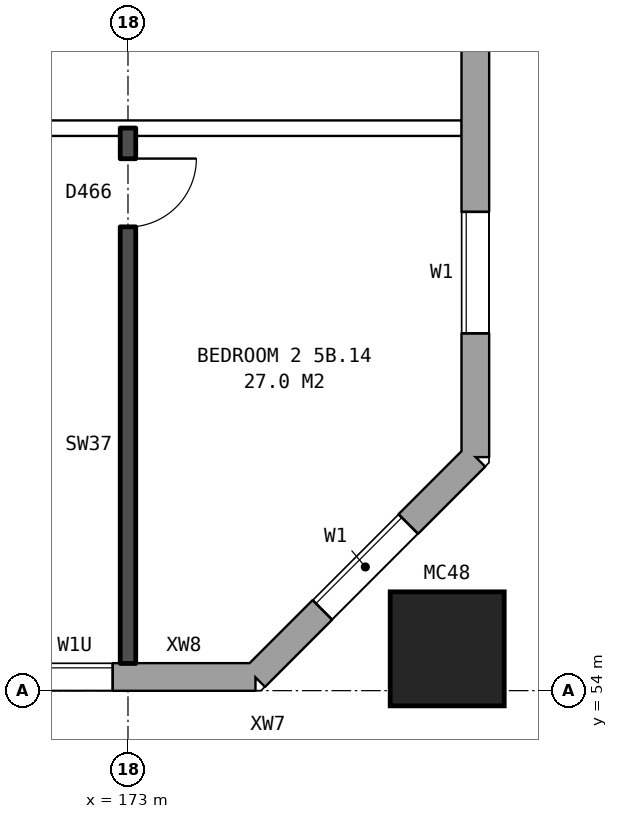
"""IFC4 building model, lengths in metres.
Left out: names, types, materials, properties, quantities, classifications, styles, units other than length and angle.
Written with IfcOpenShell. Run it as: python <this file> out.ifc"""

import sys

from ifc_helpers import new_model, si_unit, direction, frame, frame_2d, origin, origin_2d, place, context, subcontext, project, spatial, rectangle, hollow_rectangle, extrude, element, fill, save


model = new_model("IFC4")
c1 = context("Model", 3, precision=1e-05, world=origin(), true_north=direction((0.0, 1.0)))
c2 = subcontext(c1, "Body", "Model", "MODEL_VIEW")
j1 = project(units=[si_unit("LENGTHUNIT", "METRE"), si_unit("PLANEANGLEUNIT", "RADIAN")], contexts=[c1])
p1 = place(None, origin())
s1 = spatial("IfcSite", under=j1, at=p1, CompositionType="ELEMENT")
p2 = place(p1, origin())
s2 = spatial("IfcBuilding", under=s1, at=p2, CompositionType="ELEMENT")
p3 = place(p2, frame((0.0, 0.0, 22.6)))
s3 = spatial("IfcBuildingStorey", under=s2, at=p3, CompositionType="ELEMENT", Elevation=22.6)
p4 = place(p3, frame((177.2, 54.55, 0.0), z_axis=(0.0, 0.0, 1.0), x_axis=(1.0, 0.0, 0.0)))
e1 = element("IfcColumn", 1, at=p4, inside=s3, PredefinedType="COLUMN", context=c2, shape_type="SweptSolid", body=[
    extrude(hollow_rectangle(XDim=1.5, YDim=1.5, WallThickness=0.08, at=origin_2d()), origin(), (0.0, 0.0, 1.0), 3.1),
])
p5 = place(p3, frame((134.075, 54.18, 0.0), z_axis=(0.0, 0.0, 1.0), x_axis=(1.0, 0.0, 0.0)))
e2 = element("IfcWall", 2, at=p5, inside=s3, PredefinedType="STANDARD", context=c2, shape_type="SweptSolid", body=[
    extrude(rectangle(XDim=40.601, YDim=0.36, at=frame_2d((20.3, 0.0))), origin(), (0.0, 0.0, 1.0), 2.85),
])
p6 = place(p5, frame((0.3, 0.0, 0.8)))
e3 = element("IfcOpeningElement", 3, at=p6, cuts=e2, PredefinedType="OPENING", context=c2, shape_type="SweptSolid", body=[
    extrude(rectangle(XDim=1.4, YDim=1.8, at=frame_2d((0.7, 0.9))), frame((0.0, 0.19, 0.0), z_axis=(0.0, -1.0, 0.0), x_axis=(1.0, 0.0, 0.0)), (0.0, 0.0, 1.0), 0.38),
])
p7 = place(p5, frame((4.125, 0.0, 0.8)))
e4 = element("IfcOpeningElement", 4, at=p7, cuts=e2, PredefinedType="OPENING", context=c2, shape_type="SweptSolid", body=[
    extrude(rectangle(XDim=0.8, YDim=0.9, at=frame_2d((0.4, 0.45))), frame((0.0, 0.19, 0.0), z_axis=(0.0, -1.0, 0.0), x_axis=(1.0, 0.0, 0.0)), (0.0, 0.0, 1.0), 0.38),
])
p8 = place(p5, frame((6.625, 0.0, 0.8)))
e5 = element("IfcOpeningElement", 5, at=p8, cuts=e2, PredefinedType="OPENING", context=c2, shape_type="SweptSolid", body=[
    extrude(rectangle(XDim=1.6, YDim=1.8, at=frame_2d((0.8, 0.9))), frame((0.0, 0.19, 0.0), z_axis=(0.0, -1.0, 0.0), x_axis=(1.0, 0.0, 0.0)), (0.0, 0.0, 1.0), 0.38),
])
p9 = place(p5, frame((9.625, 0.0, 0.8)))
e6 = element("IfcOpeningElement", 6, at=p9, cuts=e2, PredefinedType="OPENING", context=c2, shape_type="SweptSolid", body=[
    extrude(rectangle(XDim=1.6, YDim=1.8, at=frame_2d((0.8, 0.9))), frame((0.0, 0.19, 0.0), z_axis=(0.0, -1.0, 0.0), x_axis=(1.0, 0.0, 0.0)), (0.0, 0.0, 1.0), 0.38),
])
p10 = place(p5, frame((12.625, 0.0, 0.8)))
e7 = element("IfcOpeningElement", 7, at=p10, cuts=e2, PredefinedType="OPENING", context=c2, shape_type="SweptSolid", body=[
    extrude(rectangle(XDim=1.6, YDim=1.8, at=frame_2d((0.8, 0.9))), frame((0.0, 0.19, 0.0), z_axis=(0.0, -1.0, 0.0), x_axis=(1.0, 0.0, 0.0)), (0.0, 0.0, 1.0), 0.38),
])
p11 = place(p5, frame((15.625, 0.0, 0.8)))
e8 = element("IfcOpeningElement", 8, at=p11, cuts=e2, PredefinedType="OPENING", context=c2, shape_type="SweptSolid", body=[
    extrude(rectangle(XDim=1.6, YDim=1.8, at=frame_2d((0.8, 0.9))), frame((0.0, 0.19, 0.0), z_axis=(0.0, -1.0, 0.0), x_axis=(1.0, 0.0, 0.0)), (0.0, 0.0, 1.0), 0.38),
])
p12 = place(p5, frame((18.625, 0.0, 0.8)))
e9 = element("IfcOpeningElement", 9, at=p12, cuts=e2, PredefinedType="OPENING", context=c2, shape_type="SweptSolid", body=[
    extrude(rectangle(XDim=1.6, YDim=1.8, at=frame_2d((0.8, 0.9))), frame((0.0, 0.19, 0.0), z_axis=(0.0, -1.0, 0.0), x_axis=(1.0, 0.0, 0.0)), (0.0, 0.0, 1.0), 0.38),
])
p13 = place(p5, frame((21.625, 0.0, 0.8)))
e10 = element("IfcOpeningElement", 10, at=p13, cuts=e2, PredefinedType="OPENING", context=c2, shape_type="SweptSolid", body=[
    extrude(rectangle(XDim=1.6, YDim=1.8, at=frame_2d((0.8, 0.9))), frame((0.0, 0.19, 0.0), z_axis=(0.0, -1.0, 0.0), x_axis=(1.0, 0.0, 0.0)), (0.0, 0.0, 1.0), 0.38),
])
p14 = place(p5, frame((24.625, 0.0, 0.8)))
e11 = element("IfcOpeningElement", 11, at=p14, cuts=e2, PredefinedType="OPENING", context=c2, shape_type="SweptSolid", body=[
    extrude(rectangle(XDim=1.6, YDim=1.8, at=frame_2d((0.8, 0.9))), frame((0.0, 0.19, 0.0), z_axis=(0.0, -1.0, 0.0), x_axis=(1.0, 0.0, 0.0)), (0.0, 0.0, 1.0), 0.38),
])
p15 = place(p5, frame((27.625, 0.0, 0.8)))
e12 = element("IfcOpeningElement", 12, at=p15, cuts=e2, PredefinedType="OPENING", context=c2, shape_type="SweptSolid", body=[
    extrude(rectangle(XDim=1.6, YDim=1.8, at=frame_2d((0.8, 0.9))), frame((0.0, 0.19, 0.0), z_axis=(0.0, -1.0, 0.0), x_axis=(1.0, 0.0, 0.0)), (0.0, 0.0, 1.0), 0.38),
])
p16 = place(p5, frame((30.625, 0.0, 0.8)))
e13 = element("IfcOpeningElement", 13, at=p16, cuts=e2, PredefinedType="OPENING", context=c2, shape_type="SweptSolid", body=[
    extrude(rectangle(XDim=1.6, YDim=1.8, at=frame_2d((0.8, 0.9))), frame((0.0, 0.19, 0.0), z_axis=(0.0, -1.0, 0.0), x_axis=(1.0, 0.0, 0.0)), (0.0, 0.0, 1.0), 0.38),
])
p17 = place(p5, frame((33.625, 0.0, 0.8)))
e14 = element("IfcOpeningElement", 14, at=p17, cuts=e2, PredefinedType="OPENING", context=c2, shape_type="SweptSolid", body=[
    extrude(rectangle(XDim=1.6, YDim=1.8, at=frame_2d((0.8, 0.9))), frame((0.0, 0.19, 0.0), z_axis=(0.0, -1.0, 0.0), x_axis=(1.0, 0.0, 0.0)), (0.0, 0.0, 1.0), 0.38),
])
p18 = place(p5, frame((35.525, 0.0, 0.8)))
e15 = element("IfcOpeningElement", 15, at=p18, cuts=e2, PredefinedType="OPENING", context=c2, shape_type="SweptSolid", body=[
    extrude(rectangle(XDim=0.6, YDim=1.2, at=frame_2d((0.3, 0.6))), frame((0.0, 0.19, 0.0), z_axis=(0.0, -1.0, 0.0), x_axis=(1.0, 0.0, 0.0)), (0.0, 0.0, 1.0), 0.38),
])
p19 = place(p5, frame((2.0, 0.0, 1.5)))
e16 = element("IfcOpeningElement", 16, at=p19, cuts=e2, PredefinedType="OPENING", context=c2, shape_type="SweptSolid", body=[
    extrude(rectangle(XDim=0.6, YDim=0.9, at=frame_2d((0.3, 0.45))), frame((0.0, 0.19, 0.0), z_axis=(0.0, -1.0, 0.0), x_axis=(1.0, 0.0, 0.0)), (0.0, 0.0, 1.0), 0.38),
])
p20 = place(p5, frame((5.225, 0.0, 0.8)))
e17 = element("IfcOpeningElement", 17, at=p20, cuts=e2, PredefinedType="OPENING", context=c2, shape_type="SweptSolid", body=[
    extrude(rectangle(XDim=1.0, YDim=1.8, at=frame_2d((0.5, 0.9))), frame((0.0, 0.19, 0.0), z_axis=(0.0, -1.0, 0.0), x_axis=(1.0, 0.0, 0.0)), (0.0, 0.0, 1.0), 0.38),
])
p21 = place(p5, frame((37.725, 0.0, 1.7)))
e18 = element("IfcOpeningElement", 18, at=p21, cuts=e2, PredefinedType="OPENING", context=c2, shape_type="SweptSolid", body=[
    extrude(rectangle(XDim=1.0, YDim=0.9, at=frame_2d((0.5, 0.45))), frame((0.0, 0.19, 0.0), z_axis=(0.0, -1.0, 0.0), x_axis=(1.0, 0.0, 0.0)), (0.0, 0.0, 1.0), 0.38),
])
p22 = place(p3, frame((174.675, 54.18, 0.0), z_axis=(0.0, 0.0, 1.0), x_axis=(0.707106781187, 0.707106781187, 0.0)))
e19 = element("IfcWall", 19, at=p22, inside=s3, PredefinedType="STANDARD", context=c2, shape_type="SweptSolid", body=[
    extrude(rectangle(XDim=4.094, YDim=0.36, at=frame_2d((2.047, 0.0))), origin(), (0.0, 0.0, 1.0), 2.85),
])
p23 = place(p22, frame((1.247, 0.0, 0.8)))
e20 = element("IfcOpeningElement", 20, at=p23, cuts=e19, PredefinedType="OPENING", context=c2, shape_type="SweptSolid", body=[
    extrude(rectangle(XDim=1.6, YDim=1.8, at=frame_2d((0.8, 0.9))), frame((0.0, 0.19, 0.0), z_axis=(0.0, -1.0, 0.0), x_axis=(1.0, 0.0, 0.0)), (0.0, 0.0, 1.0), 0.38),
])
p24 = place(p3, frame((177.57, 57.075, 0.0), z_axis=(0.0, 0.0, 1.0), x_axis=(0.0, 1.0, 0.0)))
e21 = element("IfcWall", 21, at=p24, inside=s3, PredefinedType="STANDARD", context=c2, shape_type="SweptSolid", body=[
    extrude(rectangle(XDim=25.851, YDim=0.36, at=frame_2d((12.925, 0.0))), origin(), (0.0, 0.0, 1.0), 2.85),
])
p25 = place(p24, frame((1.625, 0.0, 0.8)))
e22 = element("IfcOpeningElement", 22, at=p25, cuts=e21, PredefinedType="OPENING", context=c2, shape_type="SweptSolid", body=[
    extrude(rectangle(XDim=1.6, YDim=1.8, at=frame_2d((0.8, 0.9))), frame((0.0, 0.19, 0.0), z_axis=(0.0, -1.0, 0.0), x_axis=(1.0, 0.0, 0.0)), (0.0, 0.0, 1.0), 0.38),
])
p26 = place(p24, frame((6.225, 0.0, 0.8)))
e23 = element("IfcOpeningElement", 23, at=p26, cuts=e21, PredefinedType="OPENING", context=c2, shape_type="SweptSolid", body=[
    extrude(rectangle(XDim=1.0, YDim=0.9, at=frame_2d((0.5, 0.45))), frame((0.0, 0.19, 0.0), z_axis=(0.0, -1.0, 0.0), x_axis=(1.0, 0.0, 0.0)), (0.0, 0.0, 1.0), 0.38),
])
p27 = place(p24, frame((7.625, 0.0, 0.8)))
e24 = element("IfcOpeningElement", 24, at=p27, cuts=e21, PredefinedType="OPENING", context=c2, shape_type="SweptSolid", body=[
    extrude(rectangle(XDim=1.6, YDim=1.8, at=frame_2d((0.8, 0.9))), frame((0.0, 0.19, 0.0), z_axis=(0.0, -1.0, 0.0), x_axis=(1.0, 0.0, 0.0)), (0.0, 0.0, 1.0), 0.38),
])
p28 = place(p24, frame((10.625, 0.0, 0.8)))
e25 = element("IfcOpeningElement", 25, at=p28, cuts=e21, PredefinedType="OPENING", context=c2, shape_type="SweptSolid", body=[
    extrude(rectangle(XDim=1.6, YDim=1.8, at=frame_2d((0.8, 0.9))), frame((0.0, 0.19, 0.0), z_axis=(0.0, -1.0, 0.0), x_axis=(1.0, 0.0, 0.0)), (0.0, 0.0, 1.0), 0.38),
])
p29 = place(p24, frame((13.625, 0.0, 0.8)))
e26 = element("IfcOpeningElement", 26, at=p29, cuts=e21, PredefinedType="OPENING", context=c2, shape_type="SweptSolid", body=[
    extrude(rectangle(XDim=1.6, YDim=1.8, at=frame_2d((0.8, 0.9))), frame((0.0, 0.19, 0.0), z_axis=(0.0, -1.0, 0.0), x_axis=(1.0, 0.0, 0.0)), (0.0, 0.0, 1.0), 0.38),
])
p30 = place(p24, frame((16.625, 0.0, 0.8)))
e27 = element("IfcOpeningElement", 27, at=p30, cuts=e21, PredefinedType="OPENING", context=c2, shape_type="SweptSolid", body=[
    extrude(rectangle(XDim=1.6, YDim=1.8, at=frame_2d((0.8, 0.9))), frame((0.0, 0.19, 0.0), z_axis=(0.0, -1.0, 0.0), x_axis=(1.0, 0.0, 0.0)), (0.0, 0.0, 1.0), 0.38),
])
p31 = place(p24, frame((9.525, 0.0, 0.8)))
e28 = element("IfcOpeningElement", 28, at=p31, cuts=e21, PredefinedType="OPENING", context=c2, shape_type="SweptSolid", body=[
    extrude(rectangle(XDim=0.8, YDim=1.8, at=frame_2d((0.4, 0.9))), frame((0.0, 0.19, 0.0), z_axis=(0.0, -1.0, 0.0), x_axis=(1.0, 0.0, 0.0)), (0.0, 0.0, 1.0), 0.38),
])
p32 = place(p24, frame((22.625, 0.0, 0.8)))
e29 = element("IfcOpeningElement", 29, at=p32, cuts=e21, PredefinedType="OPENING", context=c2, shape_type="SweptSolid", body=[
    extrude(rectangle(XDim=1.6, YDim=1.8, at=frame_2d((0.8, 0.9))), frame((0.0, 0.19, 0.0), z_axis=(0.0, -1.0, 0.0), x_axis=(1.0, 0.0, 0.0)), (0.0, 0.0, 1.0), 0.38),
])
p33 = place(p24, frame((12.525, 0.0, 0.8)))
e30 = element("IfcOpeningElement", 30, at=p33, cuts=e21, PredefinedType="OPENING", context=c2, shape_type="SweptSolid", body=[
    extrude(rectangle(XDim=0.8, YDim=1.8, at=frame_2d((0.4, 0.9))), frame((0.0, 0.19, 0.0), z_axis=(0.0, -1.0, 0.0), x_axis=(1.0, 0.0, 0.0)), (0.0, 0.0, 1.0), 0.38),
])
p34 = place(p24, frame((15.525, 0.0, 0.8)))
e31 = element("IfcOpeningElement", 31, at=p34, cuts=e21, PredefinedType="OPENING", context=c2, shape_type="SweptSolid", body=[
    extrude(rectangle(XDim=0.8, YDim=1.8, at=frame_2d((0.4, 0.9))), frame((0.0, 0.19, 0.0), z_axis=(0.0, -1.0, 0.0), x_axis=(1.0, 0.0, 0.0)), (0.0, 0.0, 1.0), 0.38),
])
p35 = place(p24, frame((18.525, 0.0, 0.8)))
e32 = element("IfcOpeningElement", 32, at=p35, cuts=e21, PredefinedType="OPENING", context=c2, shape_type="SweptSolid", body=[
    extrude(rectangle(XDim=1.0, YDim=0.9, at=frame_2d((0.5, 0.45))), frame((0.0, 0.19, 0.0), z_axis=(0.0, -1.0, 0.0), x_axis=(1.0, 0.0, 0.0)), (0.0, 0.0, 1.0), 0.38),
])
p36 = place(p3, frame((155.1, 61.4, 0.0), z_axis=(0.0, 0.0, 1.0), x_axis=(1.0, 0.0, 0.0)))
e33 = element("IfcWall", 33, at=p36, inside=s3, PredefinedType="PARTITIONING", context=c2, shape_type="SweptSolid", body=[
    extrude(rectangle(XDim=22.29, YDim=0.2, at=frame_2d((11.145, 0.0))), origin(), (0.0, 0.0, 1.0), 2.85),
])
p37 = place(p36, frame((2.45, 0.0, 0.0)))
e34 = element("IfcOpeningElement", 34, at=p37, cuts=e33, PredefinedType="OPENING", context=c2, shape_type="SweptSolid", body=[
    extrude(rectangle(XDim=1.0, YDim=2.1, at=frame_2d((0.5, 1.05))), frame((0.0, 0.11, 0.0), z_axis=(0.0, -1.0, 0.0), x_axis=(1.0, 0.0, 0.0)), (0.0, 0.0, 1.0), 0.22),
])
p38 = place(p36, frame((14.4, 0.0, 0.0)))
e35 = element("IfcOpeningElement", 35, at=p38, cuts=e33, PredefinedType="OPENING", context=c2, shape_type="SweptSolid", body=[
    extrude(rectangle(XDim=1.0, YDim=2.1, at=frame_2d((0.5, 1.05))), frame((0.0, 0.11, 0.0), z_axis=(0.0, -1.0, 0.0), x_axis=(1.0, 0.0, 0.0)), (0.0, 0.0, 1.0), 0.22),
])
p39 = place(p3, frame((173.0, 54.36, 0.0), z_axis=(0.0, 0.0, 1.0), x_axis=(0.0, 1.0, 0.0)))
e36 = element("IfcWall", 36, at=p39, inside=s3, PredefinedType="SOLIDWALL", context=c2, shape_type="SweptSolid", body=[
    extrude(rectangle(XDim=7.04, YDim=0.2, at=frame_2d((3.52, 0.0))), origin(), (0.0, 0.0, 1.0), 2.85),
])
p40 = place(p39, frame((5.74, 0.0, 0.0)))
e37 = element("IfcOpeningElement", 37, at=p40, cuts=e36, PredefinedType="OPENING", context=c2, shape_type="SweptSolid", body=[
    extrude(rectangle(XDim=0.9, YDim=2.1, at=frame_2d((0.45, 1.05))), frame((0.0, 0.11, 0.0), z_axis=(0.0, -1.0, 0.0), x_axis=(1.0, 0.0, 0.0)), (0.0, 0.0, 1.0), 0.22),
])
p41 = place(p23, origin())
e38 = element("IfcWindow", 38, at=p41, inside=s3, PartitioningType="SINGLE_PANEL", PredefinedType="WINDOW", context=c2, shape_type="SweptSolid", body=[
    extrude(rectangle(XDim=1.6, YDim=1.8, at=frame_2d((0.8, 0.9))), frame((0.0, 0.15, 0.0), z_axis=(0.0, -1.0, 0.0), x_axis=(1.0, 0.0, 0.0)), (0.0, 0.0, 1.0), 0.06),
])
fill(e20, e38)
p42 = place(p25, origin())
e39 = element("IfcWindow", 39, at=p42, inside=s3, PartitioningType="SINGLE_PANEL", PredefinedType="WINDOW", context=c2, shape_type="SweptSolid", body=[
    extrude(rectangle(XDim=1.6, YDim=1.8, at=frame_2d((0.8, 0.9))), frame((0.0, 0.15, 0.0), z_axis=(0.0, -1.0, 0.0), x_axis=(1.0, 0.0, 0.0)), (0.0, 0.0, 1.0), 0.06),
])
fill(e22, e39)
p43 = place(p40, frame((0.9, 0.0, 0.0), z_axis=(0.0, 0.0, 1.0), x_axis=(-1.0, 0.0, 0.0)))
e40 = element("IfcDoor", 40, at=p43, inside=s3, OperationType="SINGLE_SWING_LEFT", PredefinedType="DOOR", context=c2, shape_type="SweptSolid", body=[
    extrude(rectangle(XDim=0.9, YDim=2.1, at=frame_2d((0.45, 1.05))), frame((0.0, 0.025, 0.0), z_axis=(0.0, -1.0, 0.0), x_axis=(1.0, 0.0, 0.0)), (0.0, 0.0, 1.0), 0.05),
])
fill(e37, e40)
p44 = place(p21, origin())
e41 = element("IfcWindow", 41, at=p44, inside=s3, PartitioningType="SINGLE_PANEL", PredefinedType="WINDOW", context=c2, shape_type="SweptSolid", body=[
    extrude(rectangle(XDim=1.0, YDim=0.9, at=frame_2d((0.5, 0.45))), frame((0.0, 0.15, 0.0), z_axis=(0.0, -1.0, 0.0), x_axis=(1.0, 0.0, 0.0)), (0.0, 0.0, 1.0), 0.06),
])
fill(e18, e41)
save(model, sys.argv[1])
